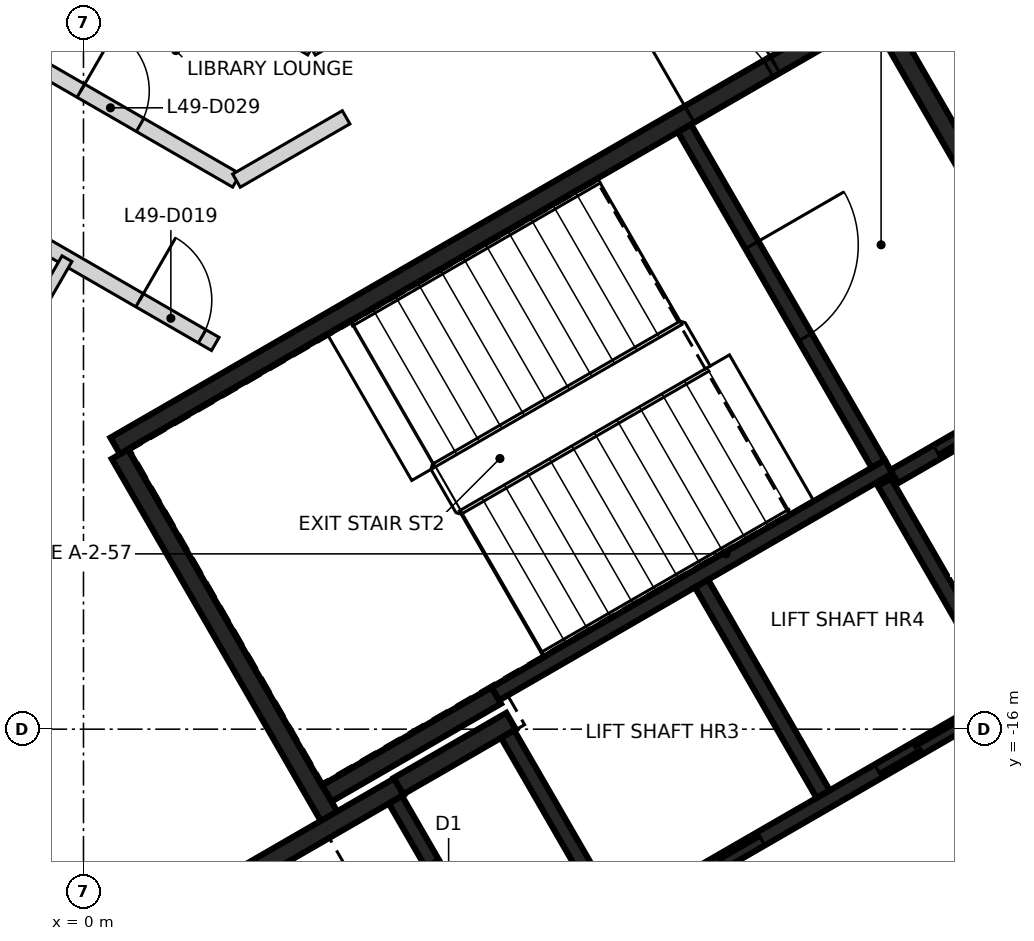
"""IFC4 building model, lengths in metres.
Left out: names, types, materials, properties, quantities, classifications, styles, units other than length and angle.
Written with IfcOpenShell. Run it as: python <this file> out.ifc"""

import sys

from ifc_helpers import new_model, si_unit, direction, frame, frame_2d, origin, place, context, subcontext, project, spatial, rectangle, extrude, element, fill, save


model = new_model("IFC4")
c1 = context("Model", 3, precision=1e-05, world=origin(), true_north=direction((0.0, 1.0)))
c2 = subcontext(c1, "Body", "Model", "MODEL_VIEW")
j1 = project(units=[si_unit("LENGTHUNIT", "METRE"), si_unit("PLANEANGLEUNIT", "RADIAN")], contexts=[c1])
p1 = place(None, origin())
s1 = spatial("IfcSite", under=j1, at=p1, CompositionType="ELEMENT")
p2 = place(p1, origin())
s2 = spatial("IfcBuilding", under=s1, at=p2, CompositionType="ELEMENT")
p3 = place(p2, frame((0.0, 0.0, 197.2)))
s3 = spatial("IfcBuildingStorey", under=s2, at=p3, CompositionType="ELEMENT", Elevation=197.2)
p4 = place(p3, frame((0.417, -12.273, 0.0), z_axis=(0.0, 0.0, 1.0), x_axis=(0.866021906294, 0.500006057782, 0.0)))
e1 = element("IfcWall", 1, at=p4, inside=s3, PredefinedType="SHEAR", context=c2, shape_type="SweptSolid", body=[
    extrude(rectangle(XDim=11.55, YDim=0.25, at=frame_2d((5.775, 0.0))), origin(), (0.0, 0.0, 1.0), 3.25),
])
p5 = place(p4, frame((10.025, 0.0, 0.0)))
e2 = element("IfcOpeningElement", 2, at=p5, cuts=e1, PredefinedType="OPENING", context=c2, shape_type="SweptSolid", body=[
    extrude(rectangle(XDim=1.2, YDim=2.1, at=frame_2d((0.6, 1.05))), frame((0.0, 0.135, 0.0), z_axis=(0.0, -1.0, 0.0), x_axis=(1.0, 0.0, 0.0)), (0.0, 0.0, 1.0), 0.27),
])
p6 = place(p4, frame((8.725, 0.0, 0.0)))
e3 = element("IfcOpeningElement", 3, at=p6, cuts=e1, PredefinedType="OPENING", context=c2, shape_type="SweptSolid", body=[
    extrude(rectangle(XDim=1.2, YDim=2.1, at=frame_2d((0.6, 1.05))), frame((0.0, 0.135, 0.0), z_axis=(0.0, -1.0, 0.0), x_axis=(1.0, 0.0, 0.0)), (0.0, 0.0, 1.0), 0.27),
])
p7 = place(p3, frame((16.133, -16.594, 0.0), z_axis=(0.0, 0.0, 1.0), x_axis=(-0.866022959057, -0.500004234368, 0.0)))
e4 = element("IfcWall", 4, at=p7, inside=s3, PredefinedType="SHEAR", context=c2, shape_type="SweptSolid", body=[
    extrude(rectangle(XDim=8.75, YDim=0.25, at=frame_2d((4.375, 0.0))), origin(), (0.0, 0.0, 1.0), 3.25),
])
p8 = place(p3, frame((3.235, -17.153, 0.0), z_axis=(0.0, 0.0, 1.0), x_axis=(-0.500008851346, 0.866020293397, 0.0)))
e5 = element("IfcWall", 5, at=p8, inside=s3, PredefinedType="SHEAR", context=c2, shape_type="SweptSolid", body=[
    extrude(rectangle(XDim=5.51, YDim=0.25, at=frame_2d((2.755, 0.0))), origin(), (0.0, 0.0, 1.0), 3.25),
])
p9 = place(p3, frame((10.483, -6.606, 0.0), z_axis=(0.0, 0.0, 1.0), x_axis=(0.49999885962, -0.866026062182, 0.0)))
e6 = element("IfcWall", 6, at=p9, inside=s3, PredefinedType="SHEAR", context=c2, shape_type="SweptSolid", body=[
    extrude(rectangle(XDim=5.225, YDim=0.25, at=frame_2d((2.612, 0.0))), origin(), (0.0, 0.0, 1.0), 3.25),
])
p10 = place(p3, frame((1.669, -18.19, 0.0), z_axis=(0.0, 0.0, 1.0), x_axis=(0.866042235819, 0.499970844928, 0.0)))
e7 = element("IfcWall", 7, at=p10, inside=s3, PredefinedType="SHEAR", context=c2, shape_type="SweptSolid", body=[
    extrude(rectangle(XDim=2.865, YDim=0.25, at=frame_2d((1.432, 0.0))), origin(), (0.0, 0.0, 1.0), 3.25),
])
p11 = place(p3, frame((5.431, -15.556, 0.0), z_axis=(0.0, 0.0, 1.0), x_axis=(-0.866022940537, -0.500004266446, 0.0)))
e8 = element("IfcWall", 8, at=p11, inside=s3, PredefinedType="SHEAR", context=c2, shape_type="SweptSolid", body=[
    extrude(rectangle(XDim=2.575, YDim=0.25, at=frame_2d((1.287, 0.0))), origin(), (0.0, 0.0, 1.0), 3.25),
])
p12 = place(p3, frame((4.145, -16.749, 0.0), z_axis=(0.0, 0.0, 1.0), x_axis=(0.866038183914, 0.499977863513, 0.0)))
e9 = element("IfcWall", 9, at=p12, inside=s3, PredefinedType="SHEAR", context=c2, shape_type="SweptSolid", body=[
    extrude(rectangle(XDim=1.71, YDim=0.25, at=frame_2d((0.855, 0.0))), origin(), (0.0, 0.0, 1.0), 3.25),
])
p13 = place(p3, frame((5.419, -15.534, 0.0), z_axis=(0.0, 0.0, 1.0), x_axis=(0.866029065029, 0.499993658486, 0.0)))
e10 = element("IfcWall", 10, at=p13, inside=s3, PredefinedType="SHEAR", context=c2, shape_type="SweptSolid", body=[
    extrude(rectangle(XDim=5.974, YDim=0.2, at=frame_2d((2.987, 0.0))), origin(), (0.0, 0.0, 1.0), 3.25),
])
p14 = place(p3, frame((7.01, -18.542, 0.0), z_axis=(0.0, 0.0, 1.0), x_axis=(0.866030299012, 0.499991521122, 0.0)))
e11 = element("IfcWall", 11, at=p14, inside=s3, PredefinedType="SHEAR", context=c2, shape_type="SweptSolid", body=[
    extrude(rectangle(XDim=6.1, YDim=0.2, at=frame_2d((3.05, 0.0))), origin(), (0.0, 0.0, 1.0), 3.25),
])
p15 = place(p14, frame((1.0, 0.0, 0.0)))
e12 = element("IfcOpeningElement", 12, at=p15, cuts=e11, PredefinedType="OPENING", context=c2, shape_type="SweptSolid", body=[
    extrude(rectangle(XDim=1.2, YDim=2.1, at=frame_2d((0.6, 1.05))), frame((0.0, 0.11, 0.0), z_axis=(0.0, -1.0, 0.0), x_axis=(1.0, 0.0, 0.0)), (0.0, 0.0, 1.0), 0.22),
])
p16 = place(p14, frame((3.982, 0.0, 0.0)))
e13 = element("IfcOpeningElement", 13, at=p16, cuts=e11, PredefinedType="OPENING", context=c2, shape_type="SweptSolid", body=[
    extrude(rectangle(XDim=1.2, YDim=2.1, at=frame_2d((0.6, 1.05))), frame((0.0, 0.11, 0.0), z_axis=(0.0, -1.0, 0.0), x_axis=(1.0, 0.0, 0.0)), (0.0, 0.0, 1.0), 0.22),
])
p17 = place(p3, frame((7.906, -8.094, 0.0), z_axis=(0.0, 0.0, 1.0), x_axis=(0.500027839223, -0.866009330205, 0.0)))
e14 = element("IfcWall", 14, at=p17, inside=s3, PredefinedType="SHEAR", context=c2, shape_type="SweptSolid", body=[
    extrude(rectangle(XDim=5.098, YDim=0.2, at=frame_2d((2.549, 0.0))), origin(), (0.0, 0.0, 1.0), 3.25),
])
p18 = place(p17, frame((1.774, 0.0, 0.0)))
e15 = element("IfcOpeningElement", 15, at=p18, cuts=e14, PredefinedType="OPENING", context=c2, shape_type="SweptSolid", body=[
    extrude(rectangle(XDim=1.4, YDim=2.1, at=frame_2d((0.7, 1.05))), frame((0.0, 0.11, 0.0), z_axis=(0.0, -1.0, 0.0), x_axis=(1.0, 0.0, 0.0)), (0.0, 0.0, 1.0), 0.22),
])
p19 = place(p3, frame((8.132, -14.084, 0.0), z_axis=(0.0, 0.0, 1.0), x_axis=(0.499997778408, -0.866026686418, 0.0)))
e16 = element("IfcWall", 16, at=p19, inside=s3, PredefinedType="SHEAR", context=c2, shape_type="SweptSolid", body=[
    extrude(rectangle(XDim=3.198, YDim=0.2, at=frame_2d((1.599, 0.0))), origin(), (0.0, 0.0, 1.0), 3.25),
])
p20 = place(p3, frame((5.503, -19.352, 0.0), z_axis=(0.0, 0.0, 1.0), x_axis=(-0.499986818241, 0.866033014143, 0.0)))
e17 = element("IfcWall", 17, at=p20, inside=s3, PredefinedType="SHEAR", context=c2, shape_type="SweptSolid", body=[
    extrude(rectangle(XDim=2.798, YDim=0.2, at=frame_2d((1.399, 0.0))), origin(), (0.0, 0.0, 1.0), 3.25),
])
p21 = place(p20, frame((0.949, 0.0, 0.0)))
e18 = element("IfcOpeningElement", 18, at=p21, cuts=e17, PredefinedType="OPENING", context=c2, shape_type="SweptSolid", body=[
    extrude(rectangle(XDim=0.9, YDim=2.1, at=frame_2d((0.45, 1.05))), frame((0.0, 0.11, 0.0), z_axis=(0.0, -1.0, 0.0), x_axis=(1.0, 0.0, 0.0)), (0.0, 0.0, 1.0), 0.22),
])
p22 = place(p3, frame((6.96, -18.455, 0.0), z_axis=(0.0, 0.0, 1.0), x_axis=(-0.499926705758, 0.866067716099, 0.0)))
e19 = element("IfcWall", 19, at=p22, inside=s3, PredefinedType="SHEAR", context=c2, shape_type="SweptSolid", body=[
    extrude(rectangle(XDim=2.759, YDim=0.2, at=frame_2d((1.38, 0.0))), origin(), (0.0, 0.0, 1.0), 3.25),
])
p23 = place(p3, frame((12.088, -15.437, 0.0), z_axis=(0.0, 0.0, 1.0), x_axis=(-0.500026960575, 0.86600983753, 0.0)))
e20 = element("IfcWall", 20, at=p23, inside=s3, PredefinedType="SHEAR", context=c2, shape_type="SweptSolid", body=[
    extrude(rectangle(XDim=3.1, YDim=0.2, at=frame_2d((1.55, 0.0))), origin(), (0.0, 0.0, 1.0), 3.25),
])
p24 = place(p3, frame((10.666, -12.678, 0.0), z_axis=(0.0, 0.0, 1.0), x_axis=(0.866018407898, 0.500012117035, 0.0)))
e21 = element("IfcWall", 21, at=p24, inside=s3, PredefinedType="SHEAR", context=c2, shape_type="SweptSolid", body=[
    extrude(rectangle(XDim=2.651, YDim=0.2, at=frame_2d((1.325, 0.0))), origin(), (0.0, 0.0, 1.0), 3.25),
])
p25 = place(p24, frame((0.652, 0.0, 0.0)))
e22 = element("IfcOpeningElement", 22, at=p25, cuts=e21, PredefinedType="OPENING", context=c2, shape_type="SweptSolid", body=[
    extrude(rectangle(XDim=1.3, YDim=2.1, at=frame_2d((0.65, 1.05))), frame((0.0, 0.11, 0.0), z_axis=(0.0, -1.0, 0.0), x_axis=(1.0, 0.0, 0.0)), (0.0, 0.0, 1.0), 0.22),
])
p26 = place(p3, frame((-8.612, -2.649, 0.0), z_axis=(0.0, 0.0, 1.0), x_axis=(0.866060983284, -0.499938369435, 0.0)))
e23 = element("IfcWall", 23, at=p26, inside=s3, PredefinedType="PARTITIONING", context=c2, shape_type="SweptSolid", body=[
    extrude(rectangle(XDim=12.268, YDim=0.2, at=frame_2d((6.134, 0.0))), origin(), (0.0, 0.0, 1.0), 3.25),
])
p27 = place(p26, frame((1.463, 0.0, 0.0)))
e24 = element("IfcOpeningElement", 24, at=p27, cuts=e23, PredefinedType="OPENING", context=c2, shape_type="SweptSolid", body=[
    extrude(rectangle(XDim=0.9, YDim=2.1, at=frame_2d((0.45, 1.05))), frame((0.0, 0.11, 0.0), z_axis=(0.0, -1.0, 0.0), x_axis=(1.0, 0.0, 0.0)), (0.0, 0.0, 1.0), 0.22),
])
p28 = place(p26, frame((5.683, 0.0, 0.0)))
e25 = element("IfcOpeningElement", 25, at=p28, cuts=e23, PredefinedType="OPENING", context=c2, shape_type="SweptSolid", body=[
    extrude(rectangle(XDim=0.9, YDim=2.1, at=frame_2d((0.45, 1.05))), frame((0.0, 0.11, 0.0), z_axis=(0.0, -1.0, 0.0), x_axis=(1.0, 0.0, 0.0)), (0.0, 0.0, 1.0), 0.22),
])
p29 = place(p26, frame((9.904, 0.0, 0.0)))
e26 = element("IfcOpeningElement", 26, at=p29, cuts=e23, PredefinedType="OPENING", context=c2, shape_type="SweptSolid", body=[
    extrude(rectangle(XDim=0.9, YDim=2.1, at=frame_2d((0.45, 1.05))), frame((0.0, 0.11, 0.0), z_axis=(0.0, -1.0, 0.0), x_axis=(1.0, 0.0, 0.0)), (0.0, 0.0, 1.0), 0.22),
])
p30 = place(p3, frame((-8.601, -4.965, 0.0), z_axis=(0.0, 0.0, 1.0), x_axis=(0.866011155539, -0.500024677872, 0.0)))
e27 = element("IfcWall", 27, at=p30, inside=s3, PredefinedType="PARTITIONING", context=c2, shape_type="SweptSolid", body=[
    extrude(rectangle(XDim=11.934, YDim=0.2, at=frame_2d((5.967, 0.0))), origin(), (0.0, 0.0, 1.0), 3.25),
])
p31 = place(p30, frame((5.039, 0.0, 0.0)))
e28 = element("IfcOpeningElement", 28, at=p31, cuts=e27, PredefinedType="OPENING", context=c2, shape_type="SweptSolid", body=[
    extrude(rectangle(XDim=0.95, YDim=2.1, at=frame_2d((0.475, 1.05))), frame((0.0, 0.11, 0.0), z_axis=(0.0, -1.0, 0.0), x_axis=(1.0, 0.0, 0.0)), (0.0, 0.0, 1.0), 0.22),
])
p32 = place(p30, frame((10.784, 0.0, 0.0)))
e29 = element("IfcOpeningElement", 29, at=p32, cuts=e27, PredefinedType="OPENING", context=c2, shape_type="SweptSolid", body=[
    extrude(rectangle(XDim=0.95, YDim=2.1, at=frame_2d((0.475, 1.05))), frame((0.0, 0.11, 0.0), z_axis=(0.0, -1.0, 0.0), x_axis=(1.0, 0.0, 0.0)), (0.0, 0.0, 1.0), 0.22),
])
p33 = place(p3, frame((2.012, -8.784, 0.0), z_axis=(0.0, 0.0, 1.0), x_axis=(0.865934186891, 0.500157959022, 0.0)))
e30 = element("IfcWall", 30, at=p33, inside=s3, PredefinedType="PARTITIONING", context=c2, shape_type="SweptSolid", body=[
    extrude(rectangle(XDim=1.666, YDim=0.2, at=frame_2d((0.833, 0.0))), origin(), (0.0, 0.0, 1.0), 3.25),
])
p34 = place(p3, frame((-7.6, -0.924, 0.0), z_axis=(0.0, 0.0, 1.0), x_axis=(0.866073324109, -0.499916990376, 0.0)))
e31 = element("IfcWall", 31, at=p34, inside=s3, PredefinedType="PARTITIONING", context=c2, shape_type="SweptSolid", body=[
    extrude(rectangle(XDim=12.24, YDim=0.2, at=frame_2d((6.12, 0.0))), origin(), (0.0, 0.0, 1.0), 3.25),
])
p35 = place(p3, frame((3.0, -7.044, 0.0), z_axis=(0.0, 0.0, 1.0), x_axis=(0.865875248522, 0.500259986404, 0.0)))
e32 = element("IfcWall", 32, at=p35, inside=s3, PredefinedType="PARTITIONING", context=c2, shape_type="SweptSolid", body=[
    extrude(rectangle(XDim=1.848, YDim=0.2, at=frame_2d((0.924, 0.0))), origin(), (0.0, 0.0, 1.0), 3.25),
])
p36 = place(p3, frame((-1.411, -11.882, 0.0), z_axis=(0.0, 0.0, 1.0), x_axis=(0.49923627015, 0.866465894635, 0.0)))
e33 = element("IfcWall", 33, at=p36, inside=s3, PredefinedType="PARTITIONING", context=c2, shape_type="SweptSolid", body=[
    extrude(rectangle(XDim=2.391, YDim=0.15, at=frame_2d((1.196, 0.0))), origin(), (0.0, 0.0, 1.0), 3.25),
])
p37 = place(p36, frame((0.796, 0.0, 0.0)))
e34 = element("IfcOpeningElement", 34, at=p37, cuts=e33, PredefinedType="OPENING", context=c2, shape_type="SweptSolid", body=[
    extrude(rectangle(XDim=0.8, YDim=2.1, at=frame_2d((0.4, 1.05))), frame((0.0, 0.085, 0.0), z_axis=(0.0, -1.0, 0.0), x_axis=(1.0, 0.0, 0.0)), (0.0, 0.0, 1.0), 0.17),
])
p38 = place(p25, origin())
e35 = element("IfcDoor", 35, at=p38, inside=s3, OperationType="SLIDING_TO_LEFT", PredefinedType="DOOR", context=c2, shape_type="SweptSolid", body=[
    extrude(rectangle(XDim=1.3, YDim=2.1, at=frame_2d((0.65, 1.05))), frame((0.0, 0.025, 0.0), z_axis=(0.0, -1.0, 0.0), x_axis=(1.0, 0.0, 0.0)), (0.0, 0.0, 1.0), 0.05),
])
fill(e22, e35)
p39 = place(p15, origin())
e36 = element("IfcDoor", 36, at=p39, inside=s3, OperationType="DOUBLE_DOOR_SLIDING", PredefinedType="DOOR", context=c2, shape_type="SweptSolid", body=[
    extrude(rectangle(XDim=1.2, YDim=2.1, at=frame_2d((0.6, 1.05))), frame((0.0, 0.025, 0.0), z_axis=(0.0, -1.0, 0.0), x_axis=(1.0, 0.0, 0.0)), (0.0, 0.0, 1.0), 0.05),
])
fill(e12, e36)
p40 = place(p16, origin())
e37 = element("IfcDoor", 37, at=p40, inside=s3, OperationType="DOUBLE_DOOR_SLIDING", PredefinedType="DOOR", context=c2, shape_type="SweptSolid", body=[
    extrude(rectangle(XDim=1.2, YDim=2.1, at=frame_2d((0.6, 1.05))), frame((0.0, 0.025, 0.0), z_axis=(0.0, -1.0, 0.0), x_axis=(1.0, 0.0, 0.0)), (0.0, 0.0, 1.0), 0.05),
])
fill(e13, e37)
p41 = place(p5, origin())
e38 = element("IfcDoor", 38, at=p41, inside=s3, OperationType="SINGLE_SWING_LEFT", PredefinedType="DOOR", context=c2, shape_type="SweptSolid", body=[
    extrude(rectangle(XDim=1.2, YDim=2.1, at=frame_2d((0.6, 1.05))), frame((0.0, 0.025, 0.0), z_axis=(0.0, -1.0, 0.0), x_axis=(1.0, 0.0, 0.0)), (0.0, 0.0, 1.0), 0.05),
])
fill(e2, e38)
p42 = place(p6, origin())
e39 = element("IfcDoor", 39, at=p42, inside=s3, OperationType="SINGLE_SWING_RIGHT", PredefinedType="DOOR", context=c2, shape_type="SweptSolid", body=[
    extrude(rectangle(XDim=1.2, YDim=2.1, at=frame_2d((0.6, 1.05))), frame((0.0, 0.025, 0.0), z_axis=(0.0, -1.0, 0.0), x_axis=(1.0, 0.0, 0.0)), (0.0, 0.0, 1.0), 0.05),
])
fill(e3, e39)
p43 = place(p18, origin())
e40 = element("IfcDoor", 40, at=p43, inside=s3, OperationType="SINGLE_SWING_LEFT", PredefinedType="DOOR", context=c2, shape_type="SweptSolid", body=[
    extrude(rectangle(XDim=1.4, YDim=2.1, at=frame_2d((0.7, 1.05))), frame((0.0, 0.025, 0.0), z_axis=(0.0, -1.0, 0.0), x_axis=(1.0, 0.0, 0.0)), (0.0, 0.0, 1.0), 0.05),
])
fill(e15, e40)
p44 = place(p32, frame((0.95, 0.0, 0.0), z_axis=(0.0, 0.0, 1.0), x_axis=(-1.0, 0.0, 0.0)))
e41 = element("IfcDoor", 41, at=p44, inside=s3, OperationType="SINGLE_SWING_LEFT", PredefinedType="DOOR", context=c2, shape_type="SweptSolid", body=[
    extrude(rectangle(XDim=0.95, YDim=2.1, at=frame_2d((0.475, 1.05))), frame((0.0, 0.025, 0.0), z_axis=(0.0, -1.0, 0.0), x_axis=(1.0, 0.0, 0.0)), (0.0, 0.0, 1.0), 0.05),
])
fill(e29, e41)
p45 = place(p29, origin())
e42 = element("IfcDoor", 42, at=p45, inside=s3, OperationType="SINGLE_SWING_LEFT", PredefinedType="DOOR", context=c2, shape_type="SweptSolid", body=[
    extrude(rectangle(XDim=0.9, YDim=2.1, at=frame_2d((0.45, 1.05))), frame((0.0, 0.025, 0.0), z_axis=(0.0, -1.0, 0.0), x_axis=(1.0, 0.0, 0.0)), (0.0, 0.0, 1.0), 0.05),
])
fill(e26, e42)
save(model, sys.argv[1])
